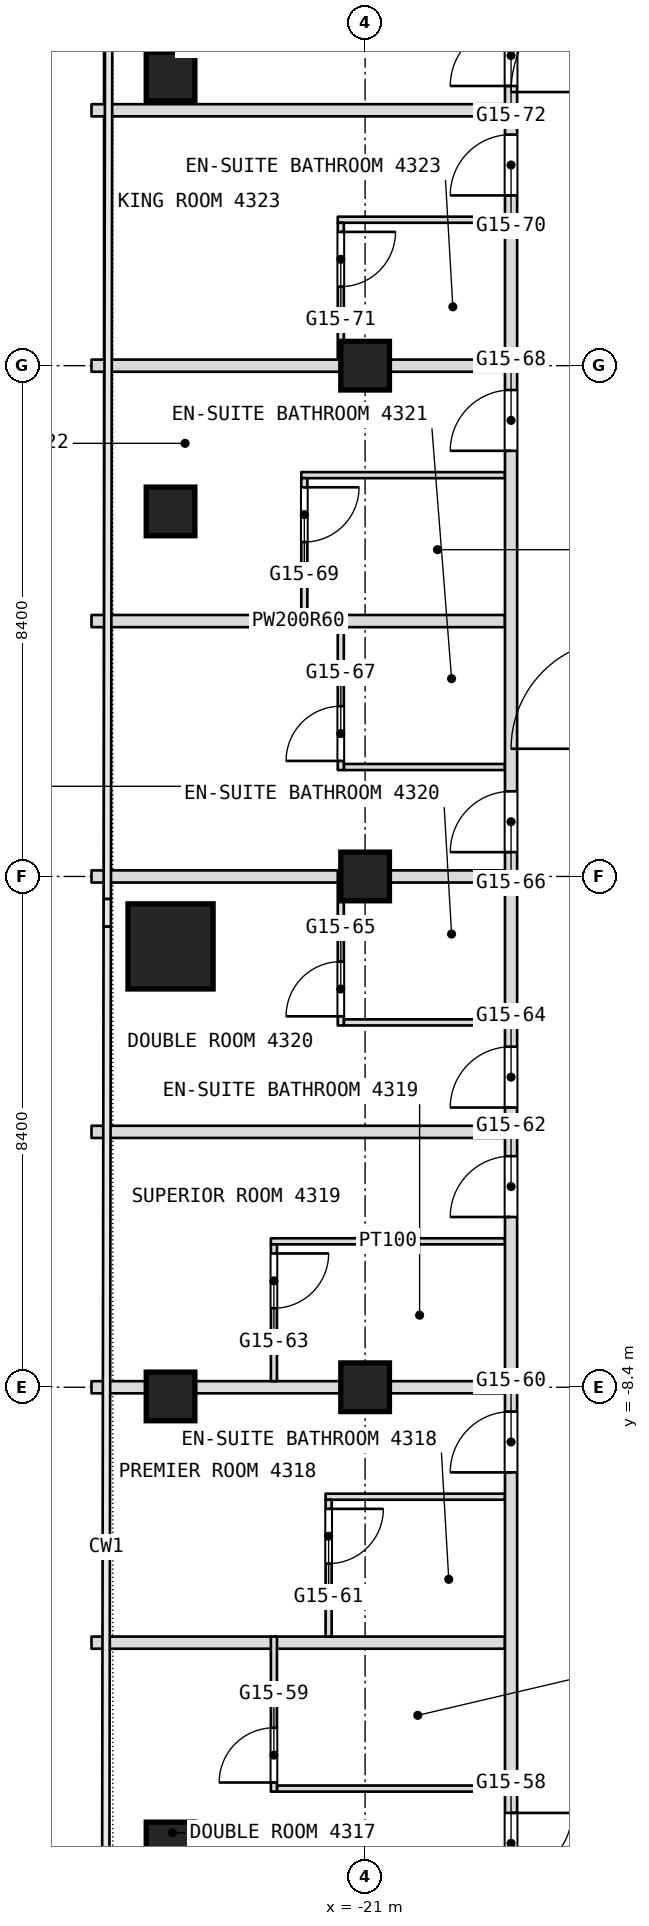
"""IFC4 building model, lengths in metres.
Left out: names, types, materials, properties, quantities, classifications, styles, units other than length and angle.
Written with IfcOpenShell. Run it as: python <this file> out.ifc"""

import sys

from ifc_helpers import new_model, si_unit, direction, frame, frame_2d, origin, origin_2d, place, context, subcontext, project, spatial, rectangle, extrude, element, fill, save


model = new_model("IFC4")
c1 = context("Model", 3, precision=1e-05, world=origin(), true_north=direction((0.0, 1.0)))
c2 = subcontext(c1, "Body", "Model", "MODEL_VIEW")
j1 = project(units=[si_unit("LENGTHUNIT", "METRE"), si_unit("PLANEANGLEUNIT", "RADIAN")], contexts=[c1])
p1 = place(None, origin())
s1 = spatial("IfcSite", under=j1, at=p1, CompositionType="ELEMENT")
p2 = place(p1, origin())
s2 = spatial("IfcBuilding", under=s1, at=p2, CompositionType="ELEMENT")
p3 = place(p2, frame((0.0, 0.0, 191.3)))
s3 = spatial("IfcBuildingStorey", under=s2, at=p3, CompositionType="ELEMENT", Elevation=191.3)
p4 = place(p3, frame((-24.2, -1.15, 0.0), z_axis=(0.0, 0.0, 1.0), x_axis=(1.0, 0.0, 0.0)))
e1 = element("IfcColumn", 1, at=p4, inside=s3, PredefinedType="COLUMN", context=c2, shape_type="SweptSolid", body=[
    extrude(rectangle(XDim=1.4, YDim=1.4, at=origin_2d()), origin(), (0.0, 0.0, 1.0), 3.6),
])
for number, where, z_axis, x_axis in (
    (2, (-21.0, -8.4, 0.0), (0.0, 0.0, 1.0), (1.0, 0.0, 0.0)),
    (3, (-21.0, 0.0, 0.0), (0.0, 0.0, 1.0), (1.0, 0.0, 0.0)),
    (4, (-21.0, 8.4, 0.0), (0.0, 0.0, 1.0), (1.0, 0.0, 0.0)),
    (5, (-24.2, -15.952, 0.0), (0.0, 0.0, 1.0), (1.0, 0.0, 0.0)),
    (6, (-24.2, -8.551, 0.0), (0.0, 0.0, 1.0), (1.0, 0.0, 0.0)),
    (7, (-24.2, 6.003, 0.0), (0.0, 0.0, 1.0), (1.0, 0.0, 0.0)),
    (8, (-24.2, 13.156, 0.0), (0.0, 0.0, 1.0), (1.0, 0.0, 0.0)),
):
    element("IfcColumn", number, at=place(p3, frame(where, z_axis=z_axis, x_axis=x_axis)), inside=s3, PredefinedType="COLUMN", context=c2, shape_type="SweptSolid", body=[
        extrude(rectangle(XDim=0.8, YDim=0.8, at=origin_2d()), origin(), (0.0, 0.0, 1.0), 3.6),
    ])
p5 = place(p3, frame((-22.45, -15.0, 0.0), z_axis=(0.0, 0.0, 1.0), x_axis=(1.0, 0.0, 0.0)))
e9 = element("IfcWall", 9, at=p5, inside=s3, PredefinedType="PARTITIONING", context=c2, shape_type="SweptSolid", body=[
    extrude(rectangle(XDim=3.75, YDim=0.1, at=frame_2d((1.875, 0.0))), origin(), (0.0, 0.0, 1.0), 3.34),
])
p6 = place(p3, frame((-25.5, -12.6, 0.0), z_axis=(0.0, 0.0, 1.0), x_axis=(1.0, 0.0, 0.0)))
e10 = element("IfcWall", 10, at=p6, inside=s3, PredefinedType="PARTITIONING", context=c2, shape_type="SweptSolid", body=[
    extrude(rectangle(XDim=6.8, YDim=0.2, at=frame_2d((3.4, 0.0))), origin(), (0.0, 0.0, 1.0), 3.34),
])
p7 = place(p3, frame((-21.65, -10.2, 0.0), z_axis=(0.0, 0.0, 1.0), x_axis=(1.0, 0.0, 0.0)))
e11 = element("IfcWall", 11, at=p7, inside=s3, PredefinedType="PARTITIONING", context=c2, shape_type="SweptSolid", body=[
    extrude(rectangle(XDim=2.95, YDim=0.1, at=frame_2d((1.475, 0.0))), origin(), (0.0, 0.0, 1.0), 3.34),
])
p8 = place(p3, frame((-25.5, -8.4, 0.0), z_axis=(0.0, 0.0, 1.0), x_axis=(1.0, 0.0, 0.0)))
e12 = element("IfcWall", 12, at=p8, inside=s3, PredefinedType="PARTITIONING", context=c2, shape_type="SweptSolid", body=[
    extrude(rectangle(XDim=6.8, YDim=0.2, at=frame_2d((3.4, 0.0))), origin(), (0.0, 0.0, 1.0), 2.94),
])
p9 = place(p3, frame((-22.55, -6.0, 0.0), z_axis=(0.0, 0.0, 1.0), x_axis=(1.0, 0.0, 0.0)))
e13 = element("IfcWall", 13, at=p9, inside=s3, PredefinedType="PARTITIONING", context=c2, shape_type="SweptSolid", body=[
    extrude(rectangle(XDim=3.85, YDim=0.1, at=frame_2d((1.925, 0.0))), origin(), (0.0, 0.0, 1.0), 3.34),
])
p10 = place(p3, frame((-25.5, -4.2, 0.0), z_axis=(0.0, 0.0, 1.0), x_axis=(1.0, 0.0, 0.0)))
e14 = element("IfcWall", 14, at=p10, inside=s3, PredefinedType="PARTITIONING", context=c2, shape_type="SweptSolid", body=[
    extrude(rectangle(XDim=6.8, YDim=0.2, at=frame_2d((3.4, 0.0))), origin(), (0.0, 0.0, 1.0), 3.34),
])
p11 = place(p3, frame((-21.35, -2.4, 0.0), z_axis=(0.0, 0.0, 1.0), x_axis=(1.0, 0.0, 0.0)))
e15 = element("IfcWall", 15, at=p11, inside=s3, PredefinedType="PARTITIONING", context=c2, shape_type="SweptSolid", body=[
    extrude(rectangle(XDim=2.65, YDim=0.1, at=frame_2d((1.325, 0.0))), origin(), (0.0, 0.0, 1.0), 3.34),
])
p12 = place(p3, frame((-25.5, 0.0, 0.0), z_axis=(0.0, 0.0, 1.0), x_axis=(1.0, 0.0, 0.0)))
e16 = element("IfcWall", 16, at=p12, inside=s3, PredefinedType="PARTITIONING", context=c2, shape_type="SweptSolid", body=[
    extrude(rectangle(XDim=6.8, YDim=0.2, at=frame_2d((3.4, 0.0))), origin(), (0.0, 0.0, 1.0), 2.94),
])
p13 = place(p3, frame((-21.35, 1.8, 0.0), z_axis=(0.0, 0.0, 1.0), x_axis=(1.0, 0.0, 0.0)))
e17 = element("IfcWall", 17, at=p13, inside=s3, PredefinedType="PARTITIONING", context=c2, shape_type="SweptSolid", body=[
    extrude(rectangle(XDim=2.65, YDim=0.1, at=frame_2d((1.325, 0.0))), origin(), (0.0, 0.0, 1.0), 3.34),
])
p14 = place(p3, frame((-25.5, 4.2, 0.0), z_axis=(0.0, 0.0, 1.0), x_axis=(1.0, 0.0, 0.0)))
e18 = element("IfcWall", 18, at=p14, inside=s3, PredefinedType="PARTITIONING", context=c2, shape_type="SweptSolid", body=[
    extrude(rectangle(XDim=6.8, YDim=0.2, at=frame_2d((3.4, 0.0))), origin(), (0.0, 0.0, 1.0), 3.34),
])
p15 = place(p3, frame((-22.05, 6.6, 0.0), z_axis=(0.0, 0.0, 1.0), x_axis=(1.0, 0.0, 0.0)))
e19 = element("IfcWall", 19, at=p15, inside=s3, PredefinedType="PARTITIONING", context=c2, shape_type="SweptSolid", body=[
    extrude(rectangle(XDim=3.35, YDim=0.1, at=frame_2d((1.675, 0.0))), origin(), (0.0, 0.0, 1.0), 3.34),
])
p16 = place(p3, frame((-25.5, 8.4, 0.0), z_axis=(0.0, 0.0, 1.0), x_axis=(1.0, 0.0, 0.0)))
e20 = element("IfcWall", 20, at=p16, inside=s3, PredefinedType="PARTITIONING", context=c2, shape_type="SweptSolid", body=[
    extrude(rectangle(XDim=6.8, YDim=0.2, at=frame_2d((3.4, 0.0))), origin(), (0.0, 0.0, 1.0), 2.94),
])
p17 = place(p3, frame((-21.45, 10.8, 0.0), z_axis=(0.0, 0.0, 1.0), x_axis=(1.0, 0.0, 0.0)))
e21 = element("IfcWall", 21, at=p17, inside=s3, PredefinedType="PARTITIONING", context=c2, shape_type="SweptSolid", body=[
    extrude(rectangle(XDim=2.75, YDim=0.1, at=frame_2d((1.375, 0.0))), origin(), (0.0, 0.0, 1.0), 3.34),
])
p18 = place(p3, frame((-25.5, 12.6, 0.0), z_axis=(0.0, 0.0, 1.0), x_axis=(1.0, 0.0, 0.0)))
e22 = element("IfcWall", 22, at=p18, inside=s3, PredefinedType="PARTITIONING", context=c2, shape_type="SweptSolid", body=[
    extrude(rectangle(XDim=6.8, YDim=0.2, at=frame_2d((3.4, 0.0))), origin(), (0.0, 0.0, 1.0), 3.34),
])
p19 = place(p3, frame((-18.6, -26.751, 0.0), z_axis=(0.0, 0.0, 1.0), x_axis=(0.0, 1.0, 0.0)))
e23 = element("IfcWall", 23, at=p19, inside=s3, PredefinedType="PARTITIONING", context=c2, shape_type="SweptSolid", body=[
    extrude(rectangle(XDim=49.091, YDim=0.2, at=frame_2d((24.545, 0.0))), origin(), (0.0, 0.0, 1.0), 3.34),
])
p20 = place(p19, frame((3.413, 0.0, 0.0)))
e24 = element("IfcOpeningElement", 24, at=p20, cuts=e23, PredefinedType="OPENING", context=c2, shape_type="SweptSolid", body=[
    extrude(rectangle(XDim=1.0, YDim=2.1, at=frame_2d((0.5, 1.05))), frame((0.0, 0.1, 0.0), z_axis=(0.0, -1.0, 0.0), x_axis=(1.0, 0.0, 0.0)), (0.0, 0.0, 1.0), 0.2),
])
p21 = place(p19, frame((5.838, 0.0, 0.0)))
e25 = element("IfcOpeningElement", 25, at=p21, cuts=e23, PredefinedType="OPENING", context=c2, shape_type="SweptSolid", body=[
    extrude(rectangle(XDim=1.0, YDim=2.1, at=frame_2d((0.5, 1.05))), frame((0.0, 0.1, 0.0), z_axis=(0.0, -1.0, 0.0), x_axis=(1.0, 0.0, 0.0)), (0.0, 0.0, 1.0), 0.2),
])
p22 = place(p19, frame((10.351, 0.0, 0.0)))
e26 = element("IfcOpeningElement", 26, at=p22, cuts=e23, PredefinedType="OPENING", context=c2, shape_type="SweptSolid", body=[
    extrude(rectangle(XDim=1.0, YDim=2.1, at=frame_2d((0.5, 1.05))), frame((0.0, 0.1, 0.0), z_axis=(0.0, -1.0, 0.0), x_axis=(1.0, 0.0, 0.0)), (0.0, 0.0, 1.0), 0.2),
])
p23 = place(p19, frame((16.951, 0.0, 0.0)))
e27 = element("IfcOpeningElement", 27, at=p23, cuts=e23, PredefinedType="OPENING", context=c2, shape_type="SweptSolid", body=[
    extrude(rectangle(XDim=1.0, YDim=2.1, at=frame_2d((0.5, 1.05))), frame((0.0, 0.1, 0.0), z_axis=(0.0, -1.0, 0.0), x_axis=(1.0, 0.0, 0.0)), (0.0, 0.0, 1.0), 0.2),
])
p24 = place(p19, frame((21.151, 0.0, 0.0)))
e28 = element("IfcOpeningElement", 28, at=p24, cuts=e23, PredefinedType="OPENING", context=c2, shape_type="SweptSolid", body=[
    extrude(rectangle(XDim=1.0, YDim=2.1, at=frame_2d((0.5, 1.05))), frame((0.0, 0.1, 0.0), z_axis=(0.0, -1.0, 0.0), x_axis=(1.0, 0.0, 0.0)), (0.0, 0.0, 1.0), 0.2),
])
p25 = place(p19, frame((22.951, 0.0, 0.0)))
e29 = element("IfcOpeningElement", 29, at=p25, cuts=e23, PredefinedType="OPENING", context=c2, shape_type="SweptSolid", body=[
    extrude(rectangle(XDim=1.0, YDim=2.1, at=frame_2d((0.5, 1.05))), frame((0.0, 0.1, 0.0), z_axis=(0.0, -1.0, 0.0), x_axis=(1.0, 0.0, 0.0)), (0.0, 0.0, 1.0), 0.2),
])
p26 = place(p19, frame((27.151, 0.0, 0.0)))
e30 = element("IfcOpeningElement", 30, at=p26, cuts=e23, PredefinedType="OPENING", context=c2, shape_type="SweptSolid", body=[
    extrude(rectangle(XDim=1.0, YDim=2.1, at=frame_2d((0.5, 1.05))), frame((0.0, 0.1, 0.0), z_axis=(0.0, -1.0, 0.0), x_axis=(1.0, 0.0, 0.0)), (0.0, 0.0, 1.0), 0.2),
])
p27 = place(p19, frame((33.751, 0.0, 0.0)))
e31 = element("IfcOpeningElement", 31, at=p27, cuts=e23, PredefinedType="OPENING", context=c2, shape_type="SweptSolid", body=[
    extrude(rectangle(XDim=1.0, YDim=2.1, at=frame_2d((0.5, 1.05))), frame((0.0, 0.1, 0.0), z_axis=(0.0, -1.0, 0.0), x_axis=(1.0, 0.0, 0.0)), (0.0, 0.0, 1.0), 0.2),
])
p28 = place(p19, frame((37.951, 0.0, 0.0)))
e32 = element("IfcOpeningElement", 32, at=p28, cuts=e23, PredefinedType="OPENING", context=c2, shape_type="SweptSolid", body=[
    extrude(rectangle(XDim=1.0, YDim=2.1, at=frame_2d((0.5, 1.05))), frame((0.0, 0.1, 0.0), z_axis=(0.0, -1.0, 0.0), x_axis=(1.0, 0.0, 0.0)), (0.0, 0.0, 1.0), 0.2),
])
p29 = place(p19, frame((39.751, 0.0, 0.0)))
e33 = element("IfcOpeningElement", 33, at=p29, cuts=e23, PredefinedType="OPENING", context=c2, shape_type="SweptSolid", body=[
    extrude(rectangle(XDim=1.0, YDim=2.1, at=frame_2d((0.5, 1.05))), frame((0.0, 0.1, 0.0), z_axis=(0.0, -1.0, 0.0), x_axis=(1.0, 0.0, 0.0)), (0.0, 0.0, 1.0), 0.2),
])
p30 = place(p19, frame((44.051, 0.0, 0.0)))
e34 = element("IfcOpeningElement", 34, at=p30, cuts=e23, PredefinedType="OPENING", context=c2, shape_type="SweptSolid", body=[
    extrude(rectangle(XDim=1.0, YDim=2.1, at=frame_2d((0.5, 1.05))), frame((0.0, 0.1, 0.0), z_axis=(0.0, -1.0, 0.0), x_axis=(1.0, 0.0, 0.0)), (0.0, 0.0, 1.0), 0.2),
])
p31 = place(p3, frame((-21.4, -2.45, 0.0), z_axis=(0.0, 0.0, 1.0), x_axis=(0.0, 1.0, 0.0)))
e35 = element("IfcWall", 35, at=p31, inside=s3, PredefinedType="PARTITIONING", context=c2, shape_type="SweptSolid", body=[
    extrude(rectangle(XDim=2.55, YDim=0.1, at=frame_2d((1.275, 0.0))), origin(), (0.0, 0.0, 1.0), 3.34),
])
p32 = place(p31, frame((0.15, 0.0, 0.0)))
e36 = element("IfcOpeningElement", 36, at=p32, cuts=e35, PredefinedType="OPENING", context=c2, shape_type="SweptSolid", body=[
    extrude(rectangle(XDim=0.9, YDim=2.1, at=frame_2d((0.45, 1.05))), frame((0.0, 0.05, 0.0), z_axis=(0.0, -1.0, 0.0), x_axis=(1.0, 0.0, 0.0)), (0.0, 0.0, 1.0), 0.1),
])
p33 = place(p3, frame((-21.4, 1.75, 0.0), z_axis=(0.0, 0.0, 1.0), x_axis=(0.0, 1.0, 0.0)))
e37 = element("IfcWall", 37, at=p33, inside=s3, PredefinedType="PARTITIONING", context=c2, shape_type="SweptSolid", body=[
    extrude(rectangle(XDim=2.55, YDim=0.1, at=frame_2d((1.275, 0.0))), origin(), (0.0, 0.0, 1.0), 3.34),
])
p34 = place(p33, frame((0.15, 0.0, 0.0)))
e38 = element("IfcOpeningElement", 38, at=p34, cuts=e37, PredefinedType="OPENING", context=c2, shape_type="SweptSolid", body=[
    extrude(rectangle(XDim=0.9, YDim=2.1, at=frame_2d((0.45, 1.05))), frame((0.0, 0.05, 0.0), z_axis=(0.0, -1.0, 0.0), x_axis=(1.0, 0.0, 0.0)), (0.0, 0.0, 1.0), 0.1),
])
p35 = place(p3, frame((-21.4, 8.5, 0.0), z_axis=(0.0, 0.0, 1.0), x_axis=(0.0, 1.0, 0.0)))
e39 = element("IfcWall", 39, at=p35, inside=s3, PredefinedType="PARTITIONING", context=c2, shape_type="SweptSolid", body=[
    extrude(rectangle(XDim=2.25, YDim=0.1, at=frame_2d((1.125, 0.0))), origin(), (0.0, 0.0, 1.0), 3.34),
])
p36 = place(p35, frame((1.2, 0.0, 0.0)))
e40 = element("IfcOpeningElement", 40, at=p36, cuts=e39, PredefinedType="OPENING", context=c2, shape_type="SweptSolid", body=[
    extrude(rectangle(XDim=0.9, YDim=2.1, at=frame_2d((0.45, 1.05))), frame((0.0, 0.05, 0.0), z_axis=(0.0, -1.0, 0.0), x_axis=(1.0, 0.0, 0.0)), (0.0, 0.0, 1.0), 0.1),
])
p37 = place(p3, frame((-21.6, -12.5, 0.0), z_axis=(0.0, 0.0, 1.0), x_axis=(0.0, 1.0, 0.0)))
e41 = element("IfcWall", 41, at=p37, inside=s3, PredefinedType="PARTITIONING", context=c2, shape_type="SweptSolid", body=[
    extrude(rectangle(XDim=2.25, YDim=0.1, at=frame_2d((1.125, 0.0))), origin(), (0.0, 0.0, 1.0), 3.34),
])
p38 = place(p37, frame((1.2, 0.0, 0.0)))
e42 = element("IfcOpeningElement", 42, at=p38, cuts=e41, PredefinedType="OPENING", context=c2, shape_type="SweptSolid", body=[
    extrude(rectangle(XDim=0.9, YDim=2.1, at=frame_2d((0.45, 1.05))), frame((0.0, 0.05, 0.0), z_axis=(0.0, -1.0, 0.0), x_axis=(1.0, 0.0, 0.0)), (0.0, 0.0, 1.0), 0.1),
])
p39 = place(p3, frame((-22.0, 4.3, 0.0), z_axis=(0.0, 0.0, 1.0), x_axis=(0.0, 1.0, 0.0)))
e43 = element("IfcWall", 43, at=p39, inside=s3, PredefinedType="PARTITIONING", context=c2, shape_type="SweptSolid", body=[
    extrude(rectangle(XDim=2.25, YDim=0.1, at=frame_2d((1.125, 0.0))), origin(), (0.0, 0.0, 1.0), 3.34),
])
p40 = place(p39, frame((1.2, 0.0, 0.0)))
e44 = element("IfcOpeningElement", 44, at=p40, cuts=e43, PredefinedType="OPENING", context=c2, shape_type="SweptSolid", body=[
    extrude(rectangle(XDim=0.9, YDim=2.1, at=frame_2d((0.45, 1.05))), frame((0.0, 0.05, 0.0), z_axis=(0.0, -1.0, 0.0), x_axis=(1.0, 0.0, 0.0)), (0.0, 0.0, 1.0), 0.1),
])
p41 = place(p3, frame((-22.5, -15.05, 0.0), z_axis=(0.0, 0.0, 1.0), x_axis=(0.0, 1.0, 0.0)))
e45 = element("IfcWall", 45, at=p41, inside=s3, PredefinedType="PARTITIONING", context=c2, shape_type="SweptSolid", body=[
    extrude(rectangle(XDim=2.55, YDim=0.1, at=frame_2d((1.275, 0.0))), origin(), (0.0, 0.0, 1.0), 3.34),
])
p42 = place(p41, frame((0.15, 0.0, 0.0)))
e46 = element("IfcOpeningElement", 46, at=p42, cuts=e45, PredefinedType="OPENING", context=c2, shape_type="SweptSolid", body=[
    extrude(rectangle(XDim=0.9, YDim=2.1, at=frame_2d((0.45, 1.05))), frame((0.0, 0.05, 0.0), z_axis=(0.0, -1.0, 0.0), x_axis=(1.0, 0.0, 0.0)), (0.0, 0.0, 1.0), 0.1),
])
p43 = place(p3, frame((-22.5, -8.3, 0.0), z_axis=(0.0, 0.0, 1.0), x_axis=(0.0, 1.0, 0.0)))
e47 = element("IfcWall", 47, at=p43, inside=s3, PredefinedType="PARTITIONING", context=c2, shape_type="SweptSolid", body=[
    extrude(rectangle(XDim=2.25, YDim=0.1, at=frame_2d((1.125, 0.0))), origin(), (0.0, 0.0, 1.0), 3.34),
])
p44 = place(p43, frame((1.2, 0.0, 0.0)))
e48 = element("IfcOpeningElement", 48, at=p44, cuts=e47, PredefinedType="OPENING", context=c2, shape_type="SweptSolid", body=[
    extrude(rectangle(XDim=0.9, YDim=2.1, at=frame_2d((0.45, 1.05))), frame((0.0, 0.05, 0.0), z_axis=(0.0, -1.0, 0.0), x_axis=(1.0, 0.0, 0.0)), (0.0, 0.0, 1.0), 0.1),
])
p45 = place(p22, origin())
e49 = element("IfcDoor", 49, at=p45, inside=s3, OperationType="SINGLE_SWING_LEFT", PredefinedType="DOOR", context=c2, shape_type="SweptSolid", body=[
    extrude(rectangle(XDim=1.0, YDim=2.1, at=frame_2d((0.5, 1.05))), frame((0.0, 0.025, 0.0), z_axis=(0.0, -1.0, 0.0), x_axis=(1.0, 0.0, 0.0)), (0.0, 0.0, 1.0), 0.05),
])
fill(e26, e49)
p46 = place(p23, origin())
e50 = element("IfcDoor", 50, at=p46, inside=s3, OperationType="SINGLE_SWING_LEFT", PredefinedType="DOOR", context=c2, shape_type="SweptSolid", body=[
    extrude(rectangle(XDim=1.0, YDim=2.1, at=frame_2d((0.5, 1.05))), frame((0.0, 0.025, 0.0), z_axis=(0.0, -1.0, 0.0), x_axis=(1.0, 0.0, 0.0)), (0.0, 0.0, 1.0), 0.05),
])
fill(e27, e50)
p47 = place(p24, origin())
e51 = element("IfcDoor", 51, at=p47, inside=s3, OperationType="SINGLE_SWING_LEFT", PredefinedType="DOOR", context=c2, shape_type="SweptSolid", body=[
    extrude(rectangle(XDim=1.0, YDim=2.1, at=frame_2d((0.5, 1.05))), frame((0.0, 0.025, 0.0), z_axis=(0.0, -1.0, 0.0), x_axis=(1.0, 0.0, 0.0)), (0.0, 0.0, 1.0), 0.05),
])
fill(e28, e51)
p48 = place(p25, origin())
e52 = element("IfcDoor", 52, at=p48, inside=s3, OperationType="SINGLE_SWING_LEFT", PredefinedType="DOOR", context=c2, shape_type="SweptSolid", body=[
    extrude(rectangle(XDim=1.0, YDim=2.1, at=frame_2d((0.5, 1.05))), frame((0.0, 0.025, 0.0), z_axis=(0.0, -1.0, 0.0), x_axis=(1.0, 0.0, 0.0)), (0.0, 0.0, 1.0), 0.05),
])
fill(e29, e52)
p49 = place(p26, origin())
e53 = element("IfcDoor", 53, at=p49, inside=s3, OperationType="SINGLE_SWING_LEFT", PredefinedType="DOOR", context=c2, shape_type="SweptSolid", body=[
    extrude(rectangle(XDim=1.0, YDim=2.1, at=frame_2d((0.5, 1.05))), frame((0.0, 0.025, 0.0), z_axis=(0.0, -1.0, 0.0), x_axis=(1.0, 0.0, 0.0)), (0.0, 0.0, 1.0), 0.05),
])
fill(e30, e53)
p50 = place(p27, origin())
e54 = element("IfcDoor", 54, at=p50, inside=s3, OperationType="SINGLE_SWING_LEFT", PredefinedType="DOOR", context=c2, shape_type="SweptSolid", body=[
    extrude(rectangle(XDim=1.0, YDim=2.1, at=frame_2d((0.5, 1.05))), frame((0.0, 0.025, 0.0), z_axis=(0.0, -1.0, 0.0), x_axis=(1.0, 0.0, 0.0)), (0.0, 0.0, 1.0), 0.05),
])
fill(e31, e54)
p51 = place(p28, origin())
e55 = element("IfcDoor", 55, at=p51, inside=s3, OperationType="SINGLE_SWING_LEFT", PredefinedType="DOOR", context=c2, shape_type="SweptSolid", body=[
    extrude(rectangle(XDim=1.0, YDim=2.1, at=frame_2d((0.5, 1.05))), frame((0.0, 0.025, 0.0), z_axis=(0.0, -1.0, 0.0), x_axis=(1.0, 0.0, 0.0)), (0.0, 0.0, 1.0), 0.05),
])
fill(e32, e55)
p52 = place(p29, origin())
e56 = element("IfcDoor", 56, at=p52, inside=s3, OperationType="SINGLE_SWING_LEFT", PredefinedType="DOOR", context=c2, shape_type="SweptSolid", body=[
    extrude(rectangle(XDim=1.0, YDim=2.1, at=frame_2d((0.5, 1.05))), frame((0.0, 0.025, 0.0), z_axis=(0.0, -1.0, 0.0), x_axis=(1.0, 0.0, 0.0)), (0.0, 0.0, 1.0), 0.05),
])
fill(e33, e56)
p53 = place(p32, origin())
e57 = element("IfcDoor", 57, at=p53, inside=s3, OperationType="SINGLE_SWING_RIGHT", PredefinedType="DOOR", context=c2, shape_type="SweptSolid", body=[
    extrude(rectangle(XDim=0.9, YDim=2.1, at=frame_2d((0.45, 1.05))), frame((0.0, 0.025, 0.0), z_axis=(0.0, -1.0, 0.0), x_axis=(1.0, 0.0, 0.0)), (0.0, 0.0, 1.0), 0.05),
])
fill(e36, e57)
p54 = place(p34, origin())
e58 = element("IfcDoor", 58, at=p54, inside=s3, OperationType="SINGLE_SWING_RIGHT", PredefinedType="DOOR", context=c2, shape_type="SweptSolid", body=[
    extrude(rectangle(XDim=0.9, YDim=2.1, at=frame_2d((0.45, 1.05))), frame((0.0, 0.025, 0.0), z_axis=(0.0, -1.0, 0.0), x_axis=(1.0, 0.0, 0.0)), (0.0, 0.0, 1.0), 0.05),
])
fill(e38, e58)
p55 = place(p36, origin())
e59 = element("IfcDoor", 59, at=p55, inside=s3, OperationType="SINGLE_SWING_LEFT", PredefinedType="DOOR", context=c2, shape_type="SweptSolid", body=[
    extrude(rectangle(XDim=0.9, YDim=2.1, at=frame_2d((0.45, 1.05))), frame((0.0, 0.025, 0.0), z_axis=(0.0, -1.0, 0.0), x_axis=(1.0, 0.0, 0.0)), (0.0, 0.0, 1.0), 0.05),
])
fill(e40, e59)
p56 = place(p38, origin())
e60 = element("IfcDoor", 60, at=p56, inside=s3, OperationType="SINGLE_SWING_LEFT", PredefinedType="DOOR", context=c2, shape_type="SweptSolid", body=[
    extrude(rectangle(XDim=0.9, YDim=2.1, at=frame_2d((0.45, 1.05))), frame((0.0, 0.025, 0.0), z_axis=(0.0, -1.0, 0.0), x_axis=(1.0, 0.0, 0.0)), (0.0, 0.0, 1.0), 0.05),
])
fill(e42, e60)
p57 = place(p40, origin())
e61 = element("IfcDoor", 61, at=p57, inside=s3, OperationType="SINGLE_SWING_LEFT", PredefinedType="DOOR", context=c2, shape_type="SweptSolid", body=[
    extrude(rectangle(XDim=0.9, YDim=2.1, at=frame_2d((0.45, 1.05))), frame((0.0, 0.025, 0.0), z_axis=(0.0, -1.0, 0.0), x_axis=(1.0, 0.0, 0.0)), (0.0, 0.0, 1.0), 0.05),
])
fill(e44, e61)
p58 = place(p42, origin())
e62 = element("IfcDoor", 62, at=p58, inside=s3, OperationType="SINGLE_SWING_RIGHT", PredefinedType="DOOR", context=c2, shape_type="SweptSolid", body=[
    extrude(rectangle(XDim=0.9, YDim=2.1, at=frame_2d((0.45, 1.05))), frame((0.0, 0.025, 0.0), z_axis=(0.0, -1.0, 0.0), x_axis=(1.0, 0.0, 0.0)), (0.0, 0.0, 1.0), 0.05),
])
fill(e46, e62)
p59 = place(p44, origin())
e63 = element("IfcDoor", 63, at=p59, inside=s3, OperationType="SINGLE_SWING_LEFT", PredefinedType="DOOR", context=c2, shape_type="SweptSolid", body=[
    extrude(rectangle(XDim=0.9, YDim=2.1, at=frame_2d((0.45, 1.05))), frame((0.0, 0.025, 0.0), z_axis=(0.0, -1.0, 0.0), x_axis=(1.0, 0.0, 0.0)), (0.0, 0.0, 1.0), 0.05),
])
fill(e48, e63)
save(model, sys.argv[1])
